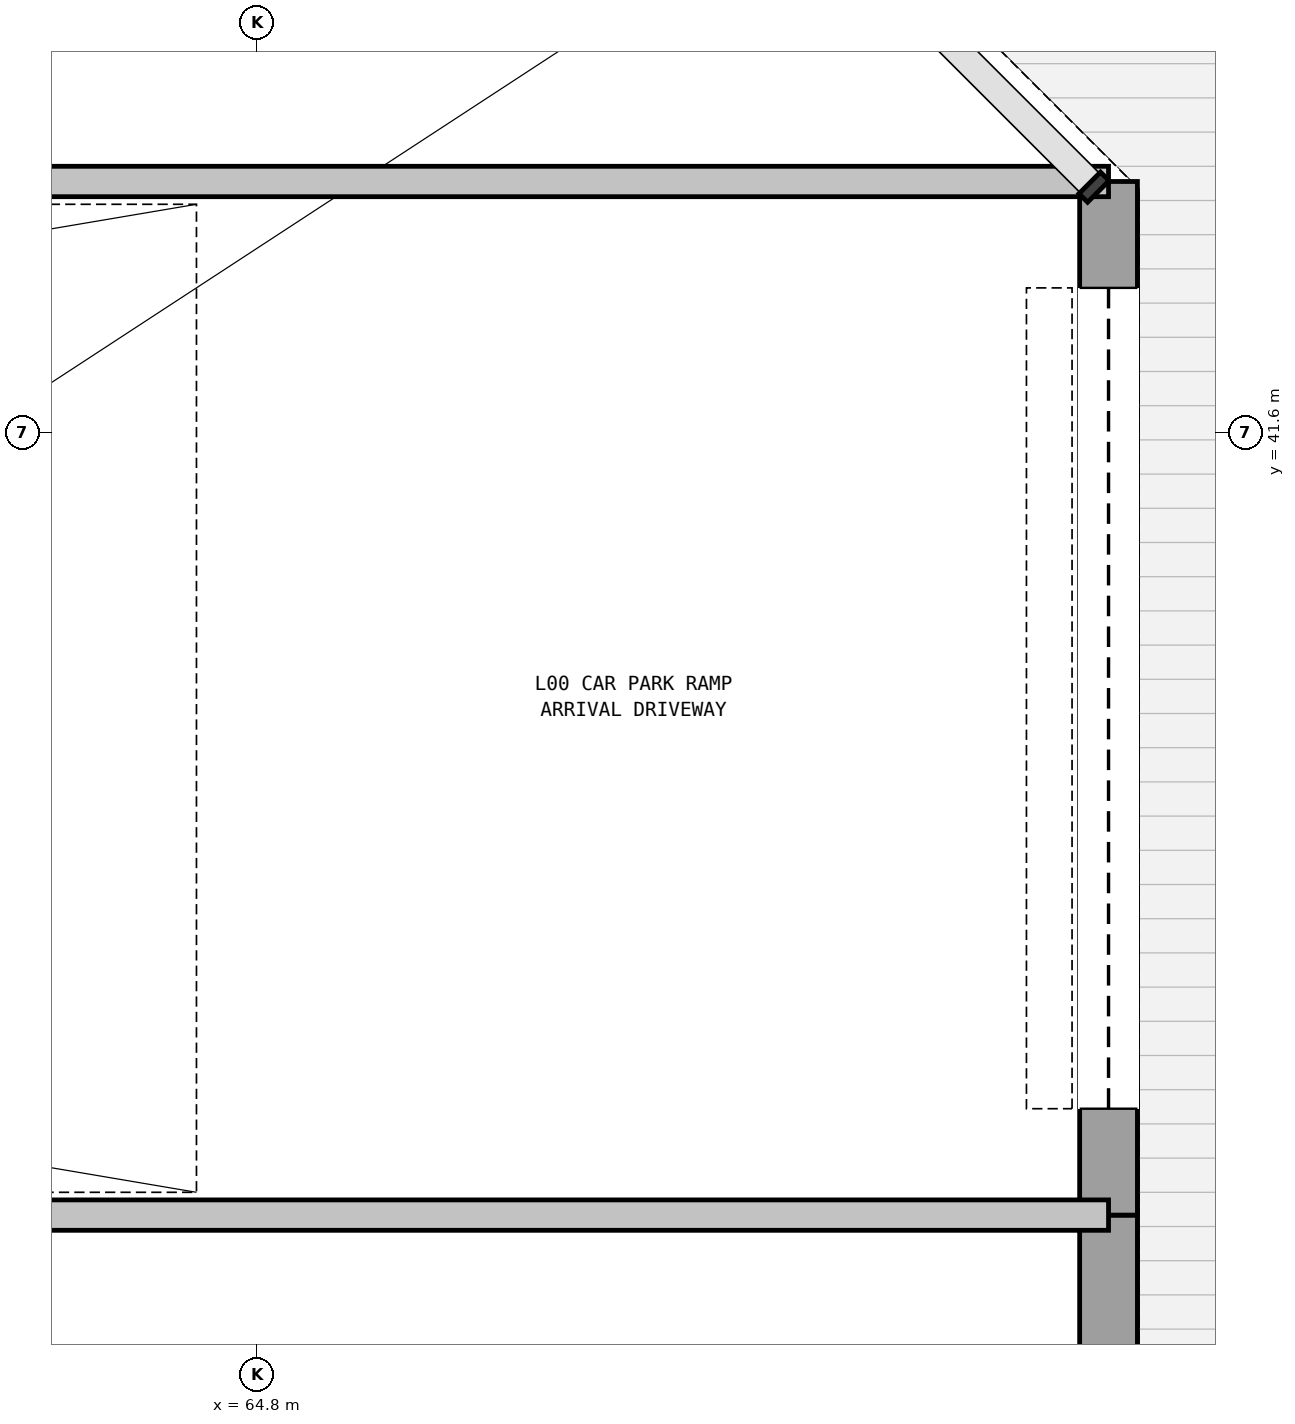
"""IFC4 building model, lengths in metres.
Left out: names, types, materials, properties, quantities, classifications, styles, units other than length and angle.
Written with IfcOpenShell. Run it as: python <this file> out.ifc"""

import sys

from ifc_helpers import new_model, si_unit, direction, frame, frame_2d, origin, place, context, subcontext, project, spatial, rectangle, extrude, source, transform, mapped, element, fill, save


model = new_model("IFC4")
c1 = context("Model", 3, precision=1e-05, world=origin(), true_north=direction((0.0, 1.0)))
c2 = subcontext(c1, "Body", "Model", "MODEL_VIEW")
j1 = project(units=[si_unit("LENGTHUNIT", "METRE"), si_unit("PLANEANGLEUNIT", "RADIAN")], contexts=[c1])
p1 = place(None, origin())
s1 = spatial("IfcSite", under=j1, at=p1, CompositionType="ELEMENT")
p2 = place(p1, origin())
s2 = spatial("IfcBuilding", under=s1, at=p2, CompositionType="ELEMENT")
p3 = place(p2, origin())
s3 = spatial("IfcBuildingStorey", under=s2, at=p3, CompositionType="ELEMENT", Elevation=0.0)
p4 = place(p3, frame((70.4, 4.883, 0.0), z_axis=(0.0, 0.0, 1.0), x_axis=(0.0, 1.0, 0.0)))
e1 = element("IfcWall", 1, at=p4, inside=s3, PredefinedType="STANDARD", context=c2, shape_type="SweptSolid", body=[
    extrude(rectangle(XDim=31.567, YDim=0.38, at=frame_2d((15.784, 0.0))), origin(), (0.0, 0.0, 1.0), 5.05),
])
p5 = place(p4, frame((15.317, 0.0, 0.0)))
e2 = element("IfcOpeningElement", 2, at=p5, cuts=e1, PredefinedType="OPENING", context=c2, shape_type="SweptSolid", body=[
    extrude(rectangle(XDim=2.2, YDim=2.6, at=frame_2d((1.1, 1.3))), frame((0.0, 0.2, 0.0), z_axis=(0.0, -1.0, 0.0), x_axis=(1.0, 0.0, 0.0)), (0.0, 0.0, 1.0), 0.4),
])
p6 = place(p3, frame((70.4, 36.45, 0.0), z_axis=(0.0, 0.0, 1.0), x_axis=(0.0, 1.0, 0.0)))
e3 = element("IfcWall", 3, at=p6, inside=s3, PredefinedType="STANDARD", context=c2, shape_type="SweptSolid", body=[
    extrude(rectangle(XDim=6.8, YDim=0.38, at=frame_2d((3.4, 0.0))), origin(), (0.0, 0.0, 1.0), 5.05),
])
p7 = place(p6, frame((0.7, 0.0, 0.0)))
e4 = element("IfcOpeningElement", 4, at=p7, cuts=e3, PredefinedType="OPENING", context=c2, shape_type="SweptSolid", body=[
    extrude(rectangle(XDim=5.4, YDim=3.2, at=frame_2d((2.7, 1.6))), frame((0.0, 0.2, 0.0), z_axis=(0.0, -1.0, 0.0), x_axis=(1.0, 0.0, 0.0)), (0.0, 0.0, 1.0), 0.4),
])
p8 = place(p3, frame((25.85, 36.45, 0.0), z_axis=(0.0, 0.0, 1.0), x_axis=(1.0, 0.0, 0.0)))
e5 = element("IfcWall", 5, at=p8, inside=s3, PredefinedType="STANDARD", context=c2, shape_type="SweptSolid", body=[
    extrude(rectangle(XDim=44.55, YDim=0.2, at=frame_2d((22.275, 0.0))), origin(), (0.0, 0.0, 1.0), 5.04),
])
p9 = place(p3, frame((55.952, 43.25, 0.0), z_axis=(0.0, 0.0, 1.0), x_axis=(1.0, 0.0, 0.0)))
e6 = element("IfcWall", 6, at=p9, inside=s3, PredefinedType="STANDARD", context=c2, shape_type="SweptSolid", body=[
    extrude(rectangle(XDim=14.448, YDim=0.2, at=frame_2d((7.224, 0.0))), origin(), (0.0, 0.0, 1.0), 5.04),
])
m1 = source(origin(), c2, "Body", "SweptSolid", [
    extrude(rectangle(XDim=5.4, YDim=3.2, at=frame_2d((2.7, 1.6))), frame((0.0, 0.025, 0.0), z_axis=(0.0, -1.0, 0.0), x_axis=(1.0, 0.0, 0.0)), (0.0, 0.0, 1.0), 0.05),
])
p10 = place(p7, origin())
e7 = element("IfcDoor", 7, at=p10, inside=s3, OperationType="ROLLINGUP", PredefinedType="GATE", context=c2, shape_type="MappedRepresentation", body=[
    mapped(m1, transform((0.0, 0.0, 0.0), scale=1.0)),
])
fill(e4, e7)
save(model, sys.argv[1])
